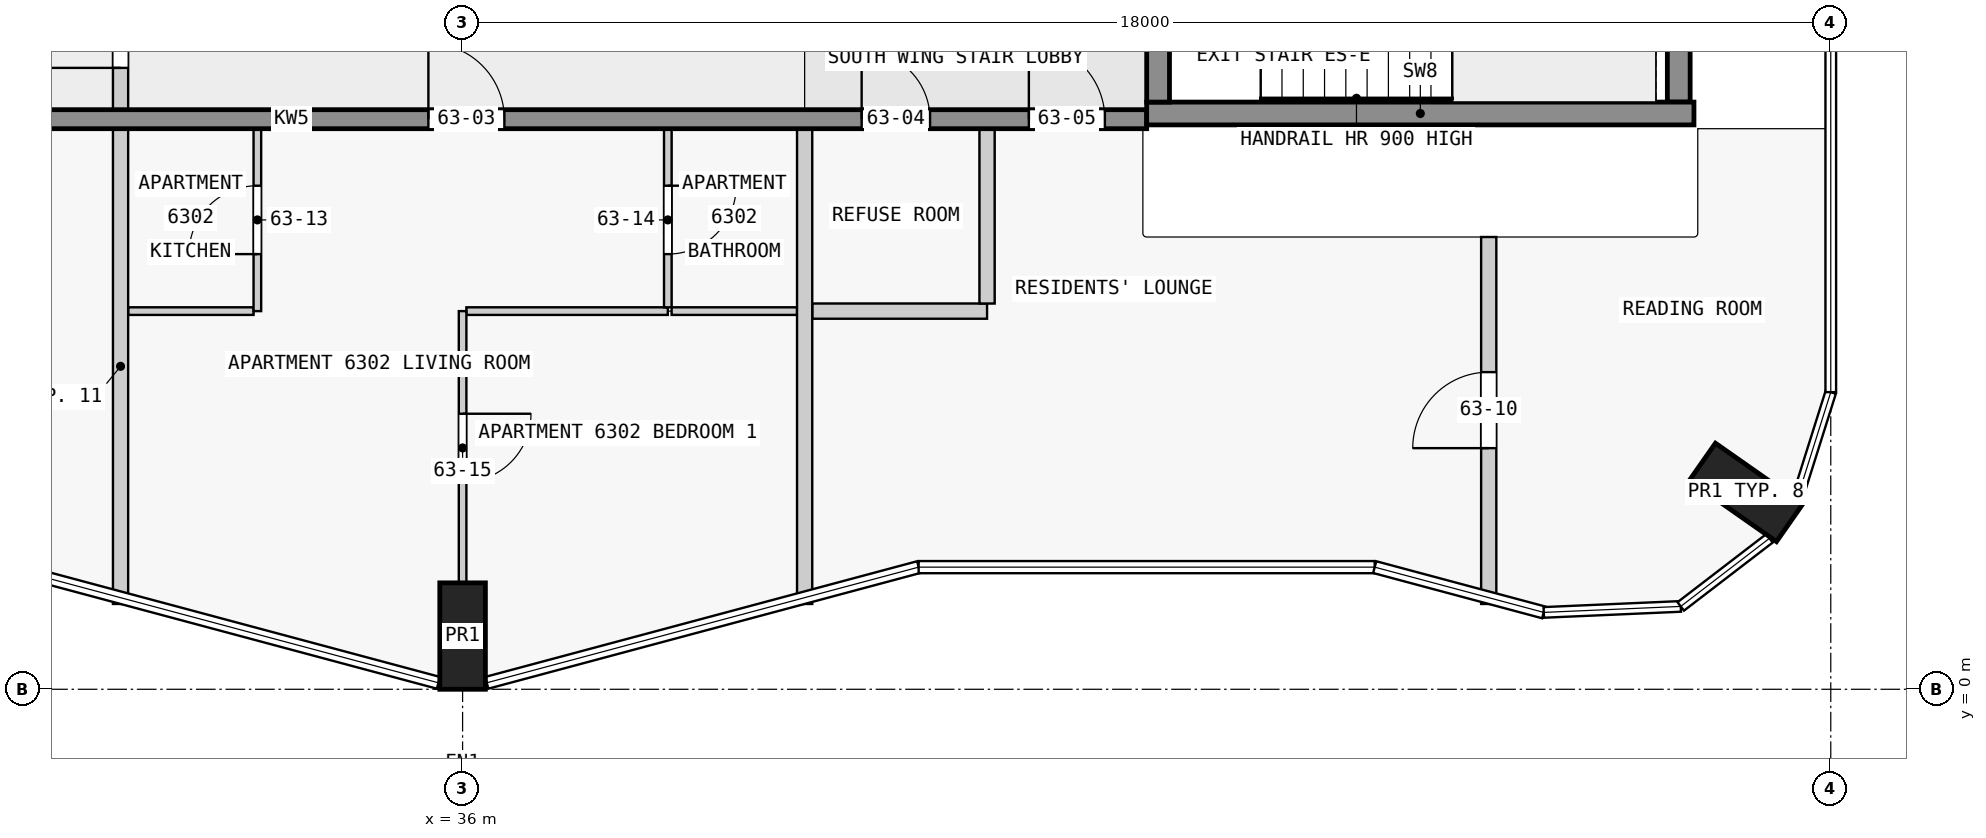
"""IFC4 building model, lengths in metres.
Left out: names, types, materials, properties, quantities, classifications, styles, units other than length and angle.
Written with IfcOpenShell. Run it as: python <this file> out.ifc"""

import sys

from ifc_helpers import new_model, si_unit, direction, frame, frame_2d, origin, origin_2d, place, context, subcontext, project, spatial, rectangle, extrude, element, fill, save


model = new_model("IFC4")
c1 = context("Model", 3, precision=1e-05, world=origin(), true_north=direction((0.0, 1.0)))
c2 = subcontext(c1, "Body", "Model", "MODEL_VIEW")
j1 = project(units=[si_unit("LENGTHUNIT", "METRE"), si_unit("PLANEANGLEUNIT", "RADIAN")], contexts=[c1])
p1 = place(None, origin())
s1 = spatial("IfcSite", under=j1, at=p1, CompositionType="ELEMENT")
p2 = place(p1, origin())
s2 = spatial("IfcBuilding", under=s1, at=p2, CompositionType="ELEMENT")
p3 = place(p2, frame((0.0, 0.0, 242.4)))
s3 = spatial("IfcBuildingStorey", under=s2, at=p3, CompositionType="ELEMENT", Elevation=242.4)
for number, where, z_axis, x_axis in (
    (1, (36.0, 0.7, 0.0), (0.0, 0.0, 1.0), (1.0, 0.0, 0.0)),
    (2, (52.884, 2.59, 0.0), (0.0, 0.0, 1.0), (0.574, 0.819, 0.0)),
):
    element("IfcColumn", number, at=place(p3, frame(where, z_axis=z_axis, x_axis=x_axis)), inside=s3, PredefinedType="COLUMN", context=c2, shape_type="SweptSolid", body=[
        extrude(rectangle(XDim=0.6, YDim=1.4, at=origin_2d()), origin(), (0.0, 0.0, 1.0), 3.5),
    ])
p4 = place(p3, frame((45.15, 7.725, 0.0), z_axis=(0.0, 0.0, 1.0), x_axis=(0.0, 1.0, 0.0)))
e3 = element("IfcWall", 3, at=p4, inside=s3, PredefinedType="SHEAR", context=c2, shape_type="SweptSolid", body=[
    extrude(rectangle(XDim=2.55, YDim=0.3, at=frame_2d((1.275, 0.0))), origin(), (0.0, 0.0, 1.0), 3.5),
])
p5 = place(p4, frame((0.725, 0.0, 0.0)))
e4 = element("IfcOpeningElement", 4, at=p5, cuts=e3, PredefinedType="OPENING", context=c2, shape_type="SweptSolid", body=[
    extrude(rectangle(XDim=1.1, YDim=2.1, at=frame_2d((0.55, 1.05))), frame((0.0, 0.16, 0.0), z_axis=(0.0, -1.0, 0.0), x_axis=(1.0, 0.0, 0.0)), (0.0, 0.0, 1.0), 0.32),
])
p6 = place(p3, frame((52.0, 7.725, 0.0), z_axis=(0.0, 0.0, 1.0), x_axis=(0.0, 1.0, 0.0)))
e5 = element("IfcWall", 5, at=p6, inside=s3, PredefinedType="SHEAR", context=c2, shape_type="SweptSolid", body=[
    extrude(rectangle(XDim=2.55, YDim=0.3, at=frame_2d((1.275, 0.0))), origin(), (0.0, 0.0, 1.0), 3.5),
])
p7 = place(p3, frame((45.0, 7.575, 0.0), z_axis=(0.0, 0.0, 1.0), x_axis=(1.0, 0.0, 0.0)))
e6 = element("IfcWall", 6, at=p7, inside=s3, PredefinedType="SHEAR", context=c2, shape_type="SweptSolid", body=[
    extrude(rectangle(XDim=7.2, YDim=0.3, at=frame_2d((3.6, 0.0))), origin(), (0.0, 0.0, 1.0), 3.5),
])
p8 = place(p3, frame((22.5, 7.5, 0.0), z_axis=(0.0, 0.0, 1.0), x_axis=(1.0, 0.0, 0.0)))
e7 = element("IfcWall", 7, at=p8, inside=s3, PredefinedType="SHEAR", context=c2, shape_type="SweptSolid", body=[
    extrude(rectangle(XDim=22.5, YDim=0.25, at=frame_2d((11.25, 0.0))), origin(), (0.0, 0.0, 1.0), 3.25),
])
p9 = place(p8, frame((1.75, 0.0, 0.0)))
e8 = element("IfcOpeningElement", 8, at=p9, cuts=e7, PredefinedType="OPENING", context=c2, shape_type="SweptSolid", body=[
    extrude(rectangle(XDim=1.0, YDim=2.1, at=frame_2d((0.5, 1.05))), frame((0.0, 0.135, 0.0), z_axis=(0.0, -1.0, 0.0), x_axis=(1.0, 0.0, 0.0)), (0.0, 0.0, 1.0), 0.27),
])
p10 = place(p8, frame((5.85, 0.0, 0.0)))
e9 = element("IfcOpeningElement", 9, at=p10, cuts=e7, PredefinedType="OPENING", context=c2, shape_type="SweptSolid", body=[
    extrude(rectangle(XDim=1.8, YDim=2.1, at=frame_2d((0.9, 1.05))), frame((0.0, 0.135, 0.0), z_axis=(0.0, -1.0, 0.0), x_axis=(1.0, 0.0, 0.0)), (0.0, 0.0, 1.0), 0.27),
])
p11 = place(p8, frame((13.05, 0.0, 0.0)))
e10 = element("IfcOpeningElement", 10, at=p11, cuts=e7, PredefinedType="OPENING", context=c2, shape_type="SweptSolid", body=[
    extrude(rectangle(XDim=1.0, YDim=2.1, at=frame_2d((0.5, 1.05))), frame((0.0, 0.135, 0.0), z_axis=(0.0, -1.0, 0.0), x_axis=(1.0, 0.0, 0.0)), (0.0, 0.0, 1.0), 0.27),
])
p12 = place(p8, frame((18.75, 0.0, 0.0)))
e11 = element("IfcOpeningElement", 11, at=p12, cuts=e7, PredefinedType="OPENING", context=c2, shape_type="SweptSolid", body=[
    extrude(rectangle(XDim=0.9, YDim=2.1, at=frame_2d((0.45, 1.05))), frame((0.0, 0.135, 0.0), z_axis=(0.0, -1.0, 0.0), x_axis=(1.0, 0.0, 0.0)), (0.0, 0.0, 1.0), 0.27),
])
p13 = place(p8, frame((20.95, 0.0, 0.0)))
e12 = element("IfcOpeningElement", 12, at=p13, cuts=e7, PredefinedType="OPENING", context=c2, shape_type="SweptSolid", body=[
    extrude(rectangle(XDim=1.0, YDim=2.1, at=frame_2d((0.5, 1.05))), frame((0.0, 0.135, 0.0), z_axis=(0.0, -1.0, 0.0), x_axis=(1.0, 0.0, 0.0)), (0.0, 0.0, 1.0), 0.27),
])
p14 = place(p3, frame((38.7, 4.975, 0.0), z_axis=(0.0, 0.0, 1.0), x_axis=(-1.0, 0.0, 0.0)))
e13 = element("IfcWall", 13, at=p14, inside=s3, PredefinedType="PARTITIONING", context=c2, shape_type="SweptSolid", body=[
    extrude(rectangle(XDim=2.65, YDim=0.1, at=frame_2d((1.325, 0.0))), origin(), (0.0, 0.0, 1.0), 3.25),
])
for number, where, z_axis, x_axis in (
    (14, (31.6, 4.975, 0.0), (0.0, 0.0, 1.0), (1.0, 0.0, 0.0)),
    (15, (38.75, 4.975, 0.0), (0.0, 0.0, 1.0), (1.0, 0.0, 0.0)),
):
    element("IfcWall", number, at=place(p3, frame(where, z_axis=z_axis, x_axis=x_axis)), inside=s3, PredefinedType="PARTITIONING", context=c2, shape_type="SweptSolid", body=[
        extrude(rectangle(XDim=1.65, YDim=0.1, at=frame_2d((0.825, 0.0))), origin(), (0.0, 0.0, 1.0), 3.25),
    ])
p15 = place(p3, frame((40.6, 4.975, 0.0), z_axis=(0.0, 0.0, 1.0), x_axis=(1.0, 0.0, 0.0)))
e16 = element("IfcWall", 16, at=p15, inside=s3, PredefinedType="PARTITIONING", context=c2, shape_type="SweptSolid", body=[
    extrude(rectangle(XDim=2.3, YDim=0.2, at=frame_2d((1.15, 0.0))), origin(), (0.0, 0.0, 1.0), 3.25),
])
p16 = place(p3, frame((31.5, 1.122, 0.0), z_axis=(0.0, 0.0, 1.0), x_axis=(0.0, 1.0, 0.0)))
e17 = element("IfcWall", 17, at=p16, inside=s3, PredefinedType="PARTITIONING", context=c2, shape_type="SweptSolid", body=[
    extrude(rectangle(XDim=6.253, YDim=0.2, at=frame_2d((3.126, 0.0))), origin(), (0.0, 0.0, 1.0), 3.25),
])
p17 = place(p3, frame((33.3, 4.975, 0.0), z_axis=(0.0, 0.0, 1.0), x_axis=(0.0, 1.0, 0.0)))
e18 = element("IfcWall", 18, at=p17, inside=s3, PredefinedType="PARTITIONING", context=c2, shape_type="SweptSolid", body=[
    extrude(rectangle(XDim=2.4, YDim=0.1, at=frame_2d((1.2, 0.0))), origin(), (0.0, 0.0, 1.0), 3.25),
])
p18 = place(p17, frame((0.75, 0.0, 0.0)))
e19 = element("IfcOpeningElement", 19, at=p18, cuts=e18, PredefinedType="OPENING", context=c2, shape_type="SweptSolid", body=[
    extrude(rectangle(XDim=0.9, YDim=2.1, at=frame_2d((0.45, 1.05))), frame((0.0, 0.06, 0.0), z_axis=(0.0, -1.0, 0.0), x_axis=(1.0, 0.0, 0.0)), (0.0, 0.0, 1.0), 0.12),
])
p19 = place(p3, frame((36.0, 4.975, 0.0), z_axis=(0.0, 0.0, 1.0), x_axis=(0.0, -1.0, 0.0)))
e20 = element("IfcWall", 20, at=p19, inside=s3, PredefinedType="PARTITIONING", context=c2, shape_type="SweptSolid", body=[
    extrude(rectangle(XDim=3.575, YDim=0.1, at=frame_2d((1.788, 0.0))), origin(), (0.0, 0.0, 1.0), 3.25),
])
p20 = place(p19, frame((1.35, 0.0, 0.0)))
e21 = element("IfcOpeningElement", 21, at=p20, cuts=e20, PredefinedType="OPENING", context=c2, shape_type="SweptSolid", body=[
    extrude(rectangle(XDim=0.9, YDim=2.1, at=frame_2d((0.45, 1.05))), frame((0.0, 0.06, 0.0), z_axis=(0.0, -1.0, 0.0), x_axis=(1.0, 0.0, 0.0)), (0.0, 0.0, 1.0), 0.12),
])
p21 = place(p3, frame((38.7, 7.375, 0.0), z_axis=(0.0, 0.0, 1.0), x_axis=(0.0, -1.0, 0.0)))
e22 = element("IfcWall", 22, at=p21, inside=s3, PredefinedType="PARTITIONING", context=c2, shape_type="SweptSolid", body=[
    extrude(rectangle(XDim=2.35, YDim=0.1, at=frame_2d((1.175, 0.0))), origin(), (0.0, 0.0, 1.0), 3.25),
])
p22 = place(p21, frame((0.75, 0.0, 0.0)))
e23 = element("IfcOpeningElement", 23, at=p22, cuts=e22, PredefinedType="OPENING", context=c2, shape_type="SweptSolid", body=[
    extrude(rectangle(XDim=0.9, YDim=2.1, at=frame_2d((0.45, 1.05))), frame((0.0, 0.06, 0.0), z_axis=(0.0, -1.0, 0.0), x_axis=(1.0, 0.0, 0.0)), (0.0, 0.0, 1.0), 0.12),
])
p23 = place(p3, frame((40.5, 1.122, 0.0), z_axis=(0.0, 0.0, 1.0), x_axis=(0.0, 1.0, 0.0)))
e24 = element("IfcWall", 24, at=p23, inside=s3, PredefinedType="PARTITIONING", context=c2, shape_type="SweptSolid", body=[
    extrude(rectangle(XDim=6.253, YDim=0.2, at=frame_2d((3.126, 0.0))), origin(), (0.0, 0.0, 1.0), 3.25),
])
p24 = place(p3, frame((42.9, 5.075, 0.0), z_axis=(0.0, 0.0, 1.0), x_axis=(0.0, 1.0, 0.0)))
e25 = element("IfcWall", 25, at=p24, inside=s3, PredefinedType="PARTITIONING", context=c2, shape_type="SweptSolid", body=[
    extrude(rectangle(XDim=2.3, YDim=0.2, at=frame_2d((1.15, 0.0))), origin(), (0.0, 0.0, 1.0), 3.25),
])
p25 = place(p3, frame((49.5, 1.122, 0.0), z_axis=(0.0, 0.0, 1.0), x_axis=(0.0, 1.0, 0.0)))
e26 = element("IfcWall", 26, at=p25, inside=s3, PredefinedType="PARTITIONING", context=c2, shape_type="SweptSolid", body=[
    extrude(rectangle(XDim=4.828, YDim=0.2, at=frame_2d((2.414, 0.0))), origin(), (0.0, 0.0, 1.0), 3.25),
])
p26 = place(p25, frame((2.05, 0.0, 0.0)))
e27 = element("IfcOpeningElement", 27, at=p26, cuts=e26, PredefinedType="OPENING", context=c2, shape_type="SweptSolid", body=[
    extrude(rectangle(XDim=1.0, YDim=2.1, at=frame_2d((0.5, 1.05))), frame((0.0, 0.11, 0.0), z_axis=(0.0, -1.0, 0.0), x_axis=(1.0, 0.0, 0.0)), (0.0, 0.0, 1.0), 0.22),
])
p27 = place(p3, frame((31.5, 7.475, 0.0), z_axis=(0.0, 0.0, 1.0), x_axis=(0.0, 1.0, 0.0)))
e28 = element("IfcWall", 28, at=p27, inside=s3, PredefinedType="PARTITIONING", context=c2, shape_type="SweptSolid", body=[
    extrude(rectangle(XDim=3.15, YDim=0.2, at=frame_2d((1.575, 0.0))), origin(), (0.0, 0.0, 1.0), 3.25),
])
p28 = place(p27, frame((0.7, 0.0, 0.0)))
e29 = element("IfcOpeningElement", 29, at=p28, cuts=e28, PredefinedType="OPENING", context=c2, shape_type="SweptSolid", body=[
    extrude(rectangle(XDim=1.8, YDim=2.1, at=frame_2d((0.9, 1.05))), frame((0.0, 0.11, 0.0), z_axis=(0.0, -1.0, 0.0), x_axis=(1.0, 0.0, 0.0)), (0.0, 0.0, 1.0), 0.22),
])
p29 = place(p11, origin())
e30 = element("IfcDoor", 30, at=p29, inside=s3, OperationType="SINGLE_SWING_RIGHT", PredefinedType="DOOR", context=c2, shape_type="SweptSolid", body=[
    extrude(rectangle(XDim=1.0, YDim=2.1, at=frame_2d((0.5, 1.05))), frame((0.0, 0.025, 0.0), z_axis=(0.0, -1.0, 0.0), x_axis=(1.0, 0.0, 0.0)), (0.0, 0.0, 1.0), 0.05),
])
fill(e10, e30)
p30 = place(p12, origin())
e31 = element("IfcDoor", 31, at=p30, inside=s3, OperationType="SINGLE_SWING_RIGHT", PredefinedType="DOOR", context=c2, shape_type="SweptSolid", body=[
    extrude(rectangle(XDim=0.9, YDim=2.1, at=frame_2d((0.45, 1.05))), frame((0.0, 0.025, 0.0), z_axis=(0.0, -1.0, 0.0), x_axis=(1.0, 0.0, 0.0)), (0.0, 0.0, 1.0), 0.05),
])
fill(e11, e31)
p31 = place(p13, origin())
e32 = element("IfcDoor", 32, at=p31, inside=s3, OperationType="SINGLE_SWING_RIGHT", PredefinedType="DOOR", context=c2, shape_type="SweptSolid", body=[
    extrude(rectangle(XDim=1.0, YDim=2.1, at=frame_2d((0.5, 1.05))), frame((0.0, 0.025, 0.0), z_axis=(0.0, -1.0, 0.0), x_axis=(1.0, 0.0, 0.0)), (0.0, 0.0, 1.0), 0.05),
])
fill(e12, e32)
p32 = place(p28, origin())
e33 = element("IfcDoor", 33, at=p32, inside=s3, OperationType="SINGLE_SWING_RIGHT", PredefinedType="DOOR", context=c2, shape_type="SweptSolid", body=[
    extrude(rectangle(XDim=1.8, YDim=2.1, at=frame_2d((0.9, 1.05))), frame((0.0, 0.025, 0.0), z_axis=(0.0, -1.0, 0.0), x_axis=(1.0, 0.0, 0.0)), (0.0, 0.0, 1.0), 0.05),
])
fill(e29, e33)
p33 = place(p26, origin())
e34 = element("IfcDoor", 34, at=p33, inside=s3, OperationType="SINGLE_SWING_RIGHT", PredefinedType="DOOR", context=c2, shape_type="SweptSolid", body=[
    extrude(rectangle(XDim=1.0, YDim=2.1, at=frame_2d((0.5, 1.05))), frame((0.0, 0.025, 0.0), z_axis=(0.0, -1.0, 0.0), x_axis=(1.0, 0.0, 0.0)), (0.0, 0.0, 1.0), 0.05),
])
fill(e27, e34)
p34 = place(p18, origin())
e35 = element("IfcDoor", 35, at=p34, inside=s3, OperationType="SINGLE_SWING_LEFT", PredefinedType="DOOR", context=c2, shape_type="SweptSolid", body=[
    extrude(rectangle(XDim=0.9, YDim=2.1, at=frame_2d((0.45, 1.05))), frame((0.0, 0.025, 0.0), z_axis=(0.0, -1.0, 0.0), x_axis=(1.0, 0.0, 0.0)), (0.0, 0.0, 1.0), 0.05),
])
fill(e19, e35)
p35 = place(p22, origin())
e36 = element("IfcDoor", 36, at=p35, inside=s3, OperationType="SINGLE_SWING_RIGHT", PredefinedType="DOOR", context=c2, shape_type="SweptSolid", body=[
    extrude(rectangle(XDim=0.9, YDim=2.1, at=frame_2d((0.45, 1.05))), frame((0.0, 0.025, 0.0), z_axis=(0.0, -1.0, 0.0), x_axis=(1.0, 0.0, 0.0)), (0.0, 0.0, 1.0), 0.05),
])
fill(e23, e36)
p36 = place(p20, origin())
e37 = element("IfcDoor", 37, at=p36, inside=s3, OperationType="SINGLE_SWING_RIGHT", PredefinedType="DOOR", context=c2, shape_type="SweptSolid", body=[
    extrude(rectangle(XDim=0.9, YDim=2.1, at=frame_2d((0.45, 1.05))), frame((0.0, 0.025, 0.0), z_axis=(0.0, -1.0, 0.0), x_axis=(1.0, 0.0, 0.0)), (0.0, 0.0, 1.0), 0.05),
])
fill(e21, e37)
save(model, sys.argv[1])
